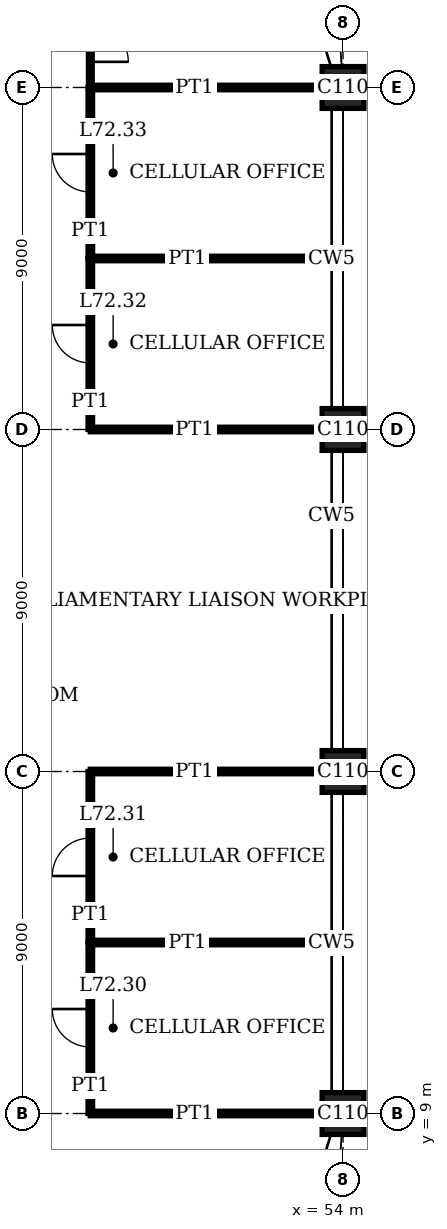
"""IFC4 building model, lengths in metres.
Left out: names, types, materials, properties, quantities, classifications, styles, units other than length and angle.
Written with IfcOpenShell. Run it as: python <this file> out.ifc"""

import sys

from ifc_helpers import new_model, si_unit, direction, frame, frame_2d, origin, origin_2d, place, context, subcontext, project, spatial, rectangle, extrude, element, fill, save


model = new_model("IFC4")
c1 = context("Model", 3, precision=1e-05, world=origin(), true_north=direction((0.0, 1.0)))
c2 = subcontext(c1, "Body", "Model", "MODEL_VIEW")
j1 = project(units=[si_unit("LENGTHUNIT", "METRE"), si_unit("PLANEANGLEUNIT", "RADIAN")], contexts=[c1])
p1 = place(None, origin())
s1 = spatial("IfcSite", under=j1, at=p1, CompositionType="ELEMENT")
p2 = place(p1, origin())
s2 = spatial("IfcBuilding", under=s1, at=p2, CompositionType="ELEMENT")
p3 = place(p2, frame((0.0, 0.0, 295.4)))
s3 = spatial("IfcBuildingStorey", under=s2, at=p3, CompositionType="ELEMENT", Elevation=295.4)
for number, where, z_axis, x_axis in (
    (1, (54.0, 9.0, 0.0), (0.0, 0.0, 1.0), (1.0, 0.0, 0.0)),
    (2, (54.0, 18.0, 0.0), (0.0, 0.0, 1.0), (1.0, 0.0, 0.0)),
    (3, (54.0, 27.0, 0.0), (0.0, 0.0, 1.0), (1.0, 0.0, 0.0)),
    (4, (54.0, 36.0, 0.0), (0.0, 0.0, 1.0), (1.0, 0.0, 0.0)),
):
    element("IfcColumn", number, at=place(p3, frame(where, z_axis=z_axis, x_axis=x_axis)), inside=s3, PredefinedType="COLUMN", context=c2, shape_type="SweptSolid", body=[
        extrude(rectangle(XDim=1.1, YDim=1.1, at=origin_2d()), origin(), (0.0, 0.0, 1.0), 4.0),
    ])
p4 = place(p3, frame((47.35, 9.0, 0.0), z_axis=(0.0, 0.0, 1.0), x_axis=(1.0, 0.0, 0.0)))
e5 = element("IfcWall", 5, at=p4, inside=s3, PredefinedType="PARTITIONING", context=c2, shape_type="SweptSolid", body=[
    extrude(rectangle(XDim=6.1, YDim=0.12, at=frame_2d((3.05, 0.0))), origin(), (0.0, 0.0, 1.0), 3.05),
])
p5 = place(p3, frame((47.35, 13.5, 0.0), z_axis=(0.0, 0.0, 1.0), x_axis=(1.0, 0.0, 0.0)))
e6 = element("IfcWall", 6, at=p5, inside=s3, PredefinedType="PARTITIONING", context=c2, shape_type="SweptSolid", body=[
    extrude(rectangle(XDim=6.34, YDim=0.12, at=frame_2d((3.17, 0.0))), origin(), (0.0, 0.0, 1.0), 3.1),
])
for number, where, z_axis, x_axis in (
    (7, (47.35, 18.0, 0.0), (0.0, 0.0, 1.0), (1.0, 0.0, 0.0)),
    (8, (47.35, 27.0, 0.0), (0.0, 0.0, 1.0), (1.0, 0.0, 0.0)),
):
    element("IfcWall", number, at=place(p3, frame(where, z_axis=z_axis, x_axis=x_axis)), inside=s3, PredefinedType="PARTITIONING", context=c2, shape_type="SweptSolid", body=[
        extrude(rectangle(XDim=6.1, YDim=0.12, at=frame_2d((3.05, 0.0))), origin(), (0.0, 0.0, 1.0), 3.05),
    ])
p6 = place(p3, frame((47.35, 31.5, 0.0), z_axis=(0.0, 0.0, 1.0), x_axis=(1.0, 0.0, 0.0)))
e9 = element("IfcWall", 9, at=p6, inside=s3, PredefinedType="PARTITIONING", context=c2, shape_type="SweptSolid", body=[
    extrude(rectangle(XDim=6.34, YDim=0.12, at=frame_2d((3.17, 0.0))), origin(), (0.0, 0.0, 1.0), 3.1),
])
p7 = place(p3, frame((47.35, 36.0, 0.0), z_axis=(0.0, 0.0, 1.0), x_axis=(1.0, 0.0, 0.0)))
e10 = element("IfcWall", 10, at=p7, inside=s3, PredefinedType="PARTITIONING", context=c2, shape_type="SweptSolid", body=[
    extrude(rectangle(XDim=6.1, YDim=0.12, at=frame_2d((3.05, 0.0))), origin(), (0.0, 0.0, 1.0), 3.05),
])
p8 = place(p3, frame((47.35, 9.0, 0.0), z_axis=(0.0, 0.0, 1.0), x_axis=(0.0, 1.0, 0.0)))
e11 = element("IfcWall", 11, at=p8, inside=s3, PredefinedType="PARTITIONING", context=c2, shape_type="SweptSolid", body=[
    extrude(rectangle(XDim=4.5, YDim=0.12, at=frame_2d((2.25, 0.0))), origin(), (0.0, 0.0, 1.0), 3.75),
])
p9 = place(p8, frame((1.75, 0.0, 0.0)))
e12 = element("IfcOpeningElement", 12, at=p9, cuts=e11, PredefinedType="OPENING", context=c2, shape_type="SweptSolid", body=[
    extrude(rectangle(XDim=1.0, YDim=2.4, at=frame_2d((0.5, 1.2))), frame((0.0, 0.07, 0.0), z_axis=(0.0, -1.0, 0.0), x_axis=(1.0, 0.0, 0.0)), (0.0, 0.0, 1.0), 0.14),
])
p10 = place(p3, frame((47.35, 13.5, 0.0), z_axis=(0.0, 0.0, 1.0), x_axis=(0.0, 1.0, 0.0)))
e13 = element("IfcWall", 13, at=p10, inside=s3, PredefinedType="PARTITIONING", context=c2, shape_type="SweptSolid", body=[
    extrude(rectangle(XDim=4.5, YDim=0.12, at=frame_2d((2.25, 0.0))), origin(), (0.0, 0.0, 1.0), 3.75),
])
p11 = place(p10, frame((1.75, 0.0, 0.0)))
e14 = element("IfcOpeningElement", 14, at=p11, cuts=e13, PredefinedType="OPENING", context=c2, shape_type="SweptSolid", body=[
    extrude(rectangle(XDim=1.0, YDim=2.4, at=frame_2d((0.5, 1.2))), frame((0.0, 0.07, 0.0), z_axis=(0.0, -1.0, 0.0), x_axis=(1.0, 0.0, 0.0)), (0.0, 0.0, 1.0), 0.14),
])
p12 = place(p3, frame((47.35, 27.0, 0.0), z_axis=(0.0, 0.0, 1.0), x_axis=(0.0, 1.0, 0.0)))
e15 = element("IfcWall", 15, at=p12, inside=s3, PredefinedType="PARTITIONING", context=c2, shape_type="SweptSolid", body=[
    extrude(rectangle(XDim=4.5, YDim=0.12, at=frame_2d((2.25, 0.0))), origin(), (0.0, 0.0, 1.0), 3.75),
])
p13 = place(p12, frame((1.75, 0.0, 0.0)))
e16 = element("IfcOpeningElement", 16, at=p13, cuts=e15, PredefinedType="OPENING", context=c2, shape_type="SweptSolid", body=[
    extrude(rectangle(XDim=1.0, YDim=2.4, at=frame_2d((0.5, 1.2))), frame((0.0, 0.07, 0.0), z_axis=(0.0, -1.0, 0.0), x_axis=(1.0, 0.0, 0.0)), (0.0, 0.0, 1.0), 0.14),
])
p14 = place(p3, frame((47.35, 31.5, 0.0), z_axis=(0.0, 0.0, 1.0), x_axis=(0.0, 1.0, 0.0)))
e17 = element("IfcWall", 17, at=p14, inside=s3, PredefinedType="PARTITIONING", context=c2, shape_type="SweptSolid", body=[
    extrude(rectangle(XDim=4.5, YDim=0.12, at=frame_2d((2.25, 0.0))), origin(), (0.0, 0.0, 1.0), 3.75),
])
p15 = place(p14, frame((1.75, 0.0, 0.0)))
e18 = element("IfcOpeningElement", 18, at=p15, cuts=e17, PredefinedType="OPENING", context=c2, shape_type="SweptSolid", body=[
    extrude(rectangle(XDim=1.0, YDim=2.4, at=frame_2d((0.5, 1.2))), frame((0.0, 0.07, 0.0), z_axis=(0.0, -1.0, 0.0), x_axis=(1.0, 0.0, 0.0)), (0.0, 0.0, 1.0), 0.14),
])
p16 = place(p3, frame((47.35, 36.0, 0.0), z_axis=(0.0, 0.0, 1.0), x_axis=(0.0, 1.0, 0.0)))
e19 = element("IfcWall", 19, at=p16, inside=s3, PredefinedType="PARTITIONING", context=c2, shape_type="SweptSolid", body=[
    extrude(rectangle(XDim=2.35, YDim=0.1, at=frame_2d((1.175, 0.0))), origin(), (0.0, 0.0, 1.0), 3.75),
])
p17 = place(p16, frame((0.675, 0.0, 0.0)))
e20 = element("IfcOpeningElement", 20, at=p17, cuts=e19, PredefinedType="OPENING", context=c2, shape_type="SweptSolid", body=[
    extrude(rectangle(XDim=1.0, YDim=2.4, at=frame_2d((0.5, 1.2))), frame((0.0, 0.06, 0.0), z_axis=(0.0, -1.0, 0.0), x_axis=(1.0, 0.0, 0.0)), (0.0, 0.0, 1.0), 0.12),
])
p18 = place(p9, origin())
e21 = element("IfcDoor", 21, at=p18, inside=s3, OperationType="SINGLE_SWING_LEFT", PredefinedType="DOOR", context=c2, shape_type="SweptSolid", body=[
    extrude(rectangle(XDim=1.0, YDim=2.4, at=frame_2d((0.5, 1.2))), frame((0.0, 0.025, 0.0), z_axis=(0.0, -1.0, 0.0), x_axis=(1.0, 0.0, 0.0)), (0.0, 0.0, 1.0), 0.05),
])
fill(e12, e21)
p19 = place(p11, origin())
e22 = element("IfcDoor", 22, at=p19, inside=s3, OperationType="SINGLE_SWING_RIGHT", PredefinedType="DOOR", context=c2, shape_type="SweptSolid", body=[
    extrude(rectangle(XDim=1.0, YDim=2.4, at=frame_2d((0.5, 1.2))), frame((0.0, 0.025, 0.0), z_axis=(0.0, -1.0, 0.0), x_axis=(1.0, 0.0, 0.0)), (0.0, 0.0, 1.0), 0.05),
])
fill(e14, e22)
p20 = place(p13, origin())
e23 = element("IfcDoor", 23, at=p20, inside=s3, OperationType="SINGLE_SWING_LEFT", PredefinedType="DOOR", context=c2, shape_type="SweptSolid", body=[
    extrude(rectangle(XDim=1.0, YDim=2.4, at=frame_2d((0.5, 1.2))), frame((0.0, 0.025, 0.0), z_axis=(0.0, -1.0, 0.0), x_axis=(1.0, 0.0, 0.0)), (0.0, 0.0, 1.0), 0.05),
])
fill(e16, e23)
p21 = place(p15, origin())
e24 = element("IfcDoor", 24, at=p21, inside=s3, OperationType="SINGLE_SWING_LEFT", PredefinedType="DOOR", context=c2, shape_type="SweptSolid", body=[
    extrude(rectangle(XDim=1.0, YDim=2.4, at=frame_2d((0.5, 1.2))), frame((0.0, 0.025, 0.0), z_axis=(0.0, -1.0, 0.0), x_axis=(1.0, 0.0, 0.0)), (0.0, 0.0, 1.0), 0.05),
])
fill(e18, e24)
p22 = place(p17, origin())
e25 = element("IfcDoor", 25, at=p22, inside=s3, OperationType="SINGLE_SWING_LEFT", PredefinedType="DOOR", context=c2, shape_type="SweptSolid", body=[
    extrude(rectangle(XDim=1.0, YDim=2.4, at=frame_2d((0.5, 1.2))), frame((0.0, 0.02, 0.0), z_axis=(0.0, -1.0, 0.0), x_axis=(1.0, 0.0, 0.0)), (0.0, 0.0, 1.0), 0.04),
])
fill(e20, e25)
save(model, sys.argv[1])
